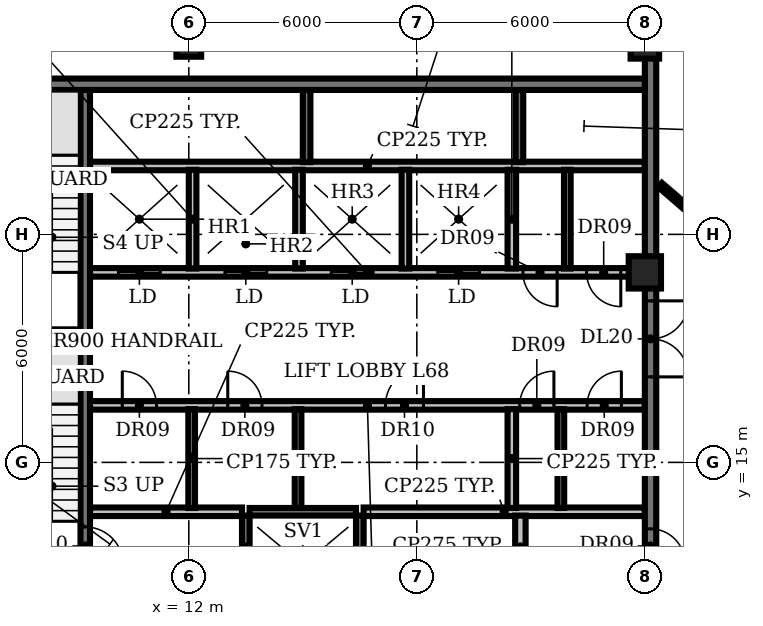
"""IFC4 building model, lengths in metres.
Left out: names, types, materials, properties, quantities, classifications, styles, units other than length and angle.
Written with IfcOpenShell. Run it as: python <this file> out.ifc"""

import sys

from ifc_helpers import new_model, si_unit, direction, frame, frame_2d, origin, origin_2d, place, context, subcontext, project, spatial, rectangle, circle, extrude, element, fill, save


model = new_model("IFC4")
c1 = context("Model", 3, precision=1e-05, world=origin(), true_north=direction((0.0, 1.0)))
c2 = subcontext(c1, "Body", "Model", "MODEL_VIEW")
j1 = project(units=[si_unit("LENGTHUNIT", "METRE"), si_unit("PLANEANGLEUNIT", "RADIAN")], contexts=[c1])
p1 = place(None, origin())
s1 = spatial("IfcSite", under=j1, at=p1, CompositionType="ELEMENT")
p2 = place(p1, origin())
s2 = spatial("IfcBuilding", under=s1, at=p2, CompositionType="ELEMENT")
p3 = place(p2, frame((0.0, 0.0, 306.2)))
s3 = spatial("IfcBuildingStorey", under=s2, at=p3, CompositionType="ELEMENT", Elevation=306.2)
p4 = place(p3, frame((12.0, 26.0, 0.0), z_axis=(0.0, 0.0, 1.0), x_axis=(1.0, 0.0, 0.0)))
e1 = element("IfcColumn", 1, at=p4, inside=s3, PredefinedType="COLUMN", context=c2, shape_type="SweptSolid", body=[
    extrude(rectangle(XDim=0.65, YDim=0.65, at=origin_2d()), origin(), (0.0, 0.0, 1.0), 3.85),
])
p5 = place(p3, frame((24.0, 20.0, 0.0), z_axis=(0.0, 0.0, 1.0), x_axis=(1.0, 0.0, 0.0)))
e2 = element("IfcColumn", 2, at=p5, inside=s3, PredefinedType="COLUMN", context=c2, shape_type="SweptSolid", body=[
    extrude(circle(Radius=0.425, at=origin_2d()), origin(), (0.0, 0.0, 1.0), 3.85),
])
p6 = place(p3, frame((24.0, 26.0, 0.0), z_axis=(0.0, 0.0, 1.0), x_axis=(1.0, 0.0, 0.0)))
e3 = element("IfcColumn", 3, at=p6, inside=s3, PredefinedType="COLUMN", context=c2, shape_type="SweptSolid", body=[
    extrude(rectangle(XDim=0.75, YDim=0.75, at=origin_2d()), origin(), (0.0, 0.0, 1.0), 3.85),
])
p7 = place(p3, frame((9.4, 13.7, 0.0), z_axis=(0.0, 0.0, 1.0), x_axis=(1.0, 0.0, 0.0)))
e4 = element("IfcWall", 4, at=p7, inside=s3, PredefinedType="PARTITIONING", context=c2, shape_type="SweptSolid", body=[
    extrude(rectangle(XDim=4.0, YDim=0.225, at=frame_2d((2.0, 0.0))), origin(), (0.0, 0.0, 1.0), 3.85),
])
p8 = place(p3, frame((13.6, 13.7, 0.0), z_axis=(0.0, 0.0, 1.0), x_axis=(1.0, 0.0, 0.0)))
e5 = element("IfcWall", 5, at=p8, inside=s3, PredefinedType="SHEAR", context=c2, shape_type="SweptSolid", body=[
    extrude(rectangle(XDim=2.8, YDim=0.2, at=frame_2d((1.4, 0.0))), origin(), (0.0, 0.0, 1.0), 3.85),
])
p9 = place(p3, frame((16.6, 13.7, 0.0), z_axis=(0.0, 0.0, 1.0), x_axis=(1.0, 0.0, 0.0)))
e6 = element("IfcWall", 6, at=p9, inside=s3, PredefinedType="PARTITIONING", context=c2, shape_type="SweptSolid", body=[
    extrude(rectangle(XDim=7.4, YDim=0.225, at=frame_2d((3.7, 0.0))), origin(), (0.0, 0.0, 1.0), 3.85),
])
p10 = place(p3, frame((9.4, 16.5, 0.0), z_axis=(0.0, 0.0, 1.0), x_axis=(1.0, 0.0, 0.0)))
e7 = element("IfcWall", 7, at=p10, inside=s3, PredefinedType="PARTITIONING", context=c2, shape_type="SweptSolid", body=[
    extrude(rectangle(XDim=14.6, YDim=0.225, at=frame_2d((7.3, 0.0))), origin(), (0.0, 0.0, 1.0), 3.85),
])
p11 = place(p10, frame((0.85, 0.0, 0.0)))
e8 = element("IfcOpeningElement", 8, at=p11, cuts=e7, PredefinedType="OPENING", context=c2, shape_type="SweptSolid", body=[
    extrude(rectangle(XDim=0.9, YDim=2.1, at=frame_2d((0.45, 1.05))), frame((0.0, 0.123, 0.0), z_axis=(0.0, -1.0, 0.0), x_axis=(1.0, 0.0, 0.0)), (0.0, 0.0, 1.0), 0.245),
])
p12 = place(p10, frame((3.625, 0.0, 0.0)))
e9 = element("IfcOpeningElement", 9, at=p12, cuts=e7, PredefinedType="OPENING", context=c2, shape_type="SweptSolid", body=[
    extrude(rectangle(XDim=0.9, YDim=2.1, at=frame_2d((0.45, 1.05))), frame((0.0, 0.123, 0.0), z_axis=(0.0, -1.0, 0.0), x_axis=(1.0, 0.0, 0.0)), (0.0, 0.0, 1.0), 0.245),
])
p13 = place(p10, frame((7.775, 0.0, 0.0)))
e10 = element("IfcOpeningElement", 10, at=p13, cuts=e7, PredefinedType="OPENING", context=c2, shape_type="SweptSolid", body=[
    extrude(rectangle(XDim=1.0, YDim=2.1, at=frame_2d((0.5, 1.05))), frame((0.0, 0.123, 0.0), z_axis=(0.0, -1.0, 0.0), x_axis=(1.0, 0.0, 0.0)), (0.0, 0.0, 1.0), 0.245),
])
p14 = place(p10, frame((11.308, 0.0, 0.0)))
e11 = element("IfcOpeningElement", 11, at=p14, cuts=e7, PredefinedType="OPENING", context=c2, shape_type="SweptSolid", body=[
    extrude(rectangle(XDim=0.9, YDim=2.1, at=frame_2d((0.45, 1.05))), frame((0.0, 0.123, 0.0), z_axis=(0.0, -1.0, 0.0), x_axis=(1.0, 0.0, 0.0)), (0.0, 0.0, 1.0), 0.245),
])
p15 = place(p10, frame((13.083, 0.0, 0.0)))
e12 = element("IfcOpeningElement", 12, at=p15, cuts=e7, PredefinedType="OPENING", context=c2, shape_type="SweptSolid", body=[
    extrude(rectangle(XDim=0.9, YDim=2.1, at=frame_2d((0.45, 1.05))), frame((0.0, 0.123, 0.0), z_axis=(0.0, -1.0, 0.0), x_axis=(1.0, 0.0, 0.0)), (0.0, 0.0, 1.0), 0.245),
])
p16 = place(p3, frame((6.0, 18.375, 0.0), z_axis=(0.0, 0.0, 1.0), x_axis=(1.0, 0.0, 0.0)))
e13 = element("IfcWall", 13, at=p16, inside=s3, PredefinedType="SHEAR", context=c2, shape_type="SweptSolid", body=[
    extrude(rectangle(XDim=3.15, YDim=0.25, at=frame_2d((1.575, 0.0))), origin(), (0.0, 0.0, 1.0), 3.85),
])
p17 = place(p3, frame((24.0, 20.0, 0.0), z_axis=(0.0, 0.0, 1.0), x_axis=(-1.0, 0.0, 0.0)))
e14 = element("IfcWall", 14, at=p17, inside=s3, PredefinedType="PARTITIONING", context=c2, shape_type="SweptSolid", body=[
    extrude(rectangle(XDim=14.6, YDim=0.225, at=frame_2d((7.3, 0.0))), origin(), (0.0, 0.0, 1.0), 3.85),
])
p18 = place(p17, frame((12.75, 0.0, 0.0)))
e15 = element("IfcOpeningElement", 15, at=p18, cuts=e14, PredefinedType="OPENING", context=c2, shape_type="SweptSolid", body=[
    extrude(rectangle(XDim=1.1, YDim=2.1, at=frame_2d((0.55, 1.05))), frame((0.0, 0.123, 0.0), z_axis=(0.0, -1.0, 0.0), x_axis=(1.0, 0.0, 0.0)), (0.0, 0.0, 1.0), 0.245),
])
p19 = place(p17, frame((9.95, 0.0, 0.0)))
e16 = element("IfcOpeningElement", 16, at=p19, cuts=e14, PredefinedType="OPENING", context=c2, shape_type="SweptSolid", body=[
    extrude(rectangle(XDim=1.1, YDim=2.1, at=frame_2d((0.55, 1.05))), frame((0.0, 0.123, 0.0), z_axis=(0.0, -1.0, 0.0), x_axis=(1.0, 0.0, 0.0)), (0.0, 0.0, 1.0), 0.245),
])
p20 = place(p17, frame((7.15, 0.0, 0.0)))
e17 = element("IfcOpeningElement", 17, at=p20, cuts=e14, PredefinedType="OPENING", context=c2, shape_type="SweptSolid", body=[
    extrude(rectangle(XDim=1.1, YDim=2.1, at=frame_2d((0.55, 1.05))), frame((0.0, 0.123, 0.0), z_axis=(0.0, -1.0, 0.0), x_axis=(1.0, 0.0, 0.0)), (0.0, 0.0, 1.0), 0.245),
])
p21 = place(p17, frame((4.35, 0.0, 0.0)))
e18 = element("IfcOpeningElement", 18, at=p21, cuts=e14, PredefinedType="OPENING", context=c2, shape_type="SweptSolid", body=[
    extrude(rectangle(XDim=1.1, YDim=2.1, at=frame_2d((0.55, 1.05))), frame((0.0, 0.123, 0.0), z_axis=(0.0, -1.0, 0.0), x_axis=(1.0, 0.0, 0.0)), (0.0, 0.0, 1.0), 0.245),
])
p22 = place(p17, frame((2.308, 0.0, 0.0)))
e19 = element("IfcOpeningElement", 19, at=p22, cuts=e14, PredefinedType="OPENING", context=c2, shape_type="SweptSolid", body=[
    extrude(rectangle(XDim=0.9, YDim=2.1, at=frame_2d((0.45, 1.05))), frame((0.0, 0.123, 0.0), z_axis=(0.0, -1.0, 0.0), x_axis=(1.0, 0.0, 0.0)), (0.0, 0.0, 1.0), 0.245),
])
p23 = place(p17, frame((0.633, 0.0, 0.0)))
e20 = element("IfcOpeningElement", 20, at=p23, cuts=e14, PredefinedType="OPENING", context=c2, shape_type="SweptSolid", body=[
    extrude(rectangle(XDim=0.9, YDim=2.1, at=frame_2d((0.45, 1.05))), frame((0.0, 0.123, 0.0), z_axis=(0.0, -1.0, 0.0), x_axis=(1.0, 0.0, 0.0)), (0.0, 0.0, 1.0), 0.245),
])
p24 = place(p3, frame((9.4, 22.8, 0.0), z_axis=(0.0, 0.0, 1.0), x_axis=(1.0, 0.0, 0.0)))
e21 = element("IfcWall", 21, at=p24, inside=s3, PredefinedType="PARTITIONING", context=c2, shape_type="SweptSolid", body=[
    extrude(rectangle(XDim=14.6, YDim=0.225, at=frame_2d((7.3, 0.0))), origin(), (0.0, 0.0, 1.0), 3.85),
])
p25 = place(p3, frame((9.275, 18.375, 0.0), z_axis=(0.0, 0.0, 1.0), x_axis=(0.0, -1.0, 0.0)))
e22 = element("IfcWall", 22, at=p25, inside=s3, PredefinedType="SHEAR", context=c2, shape_type="SweptSolid", body=[
    extrude(rectangle(XDim=6.55, YDim=0.25, at=frame_2d((3.275, 0.0))), origin(), (0.0, 0.0, 1.0), 3.85),
])
p26 = place(p25, frame((5.075, 0.0, 0.0)))
e23 = element("IfcOpeningElement", 23, at=p26, cuts=e22, PredefinedType="OPENING", context=c2, shape_type="SweptSolid", body=[
    extrude(rectangle(XDim=1.0, YDim=2.1, at=frame_2d((0.5, 1.05))), frame((0.0, 0.135, 0.0), z_axis=(0.0, -1.0, 0.0), x_axis=(1.0, 0.0, 0.0)), (0.0, 0.0, 1.0), 0.27),
])
p27 = place(p3, frame((9.275, 18.375, 0.0), z_axis=(0.0, 0.0, 1.0), x_axis=(0.0, 1.0, 0.0)))
e24 = element("IfcWall", 24, at=p27, inside=s3, PredefinedType="SHEAR", context=c2, shape_type="SweptSolid", body=[
    extrude(rectangle(XDim=6.425, YDim=0.25, at=frame_2d((3.212, 0.0))), origin(), (0.0, 0.0, 1.0), 3.85),
])
p28 = place(p3, frame((12.075, 13.8, 0.0), z_axis=(0.0, 0.0, 1.0), x_axis=(0.0, 1.0, 0.0)))
e25 = element("IfcWall", 25, at=p28, inside=s3, PredefinedType="PARTITIONING", context=c2, shape_type="SweptSolid", body=[
    extrude(rectangle(XDim=2.6, YDim=0.175, at=frame_2d((1.3, 0.0))), origin(), (0.0, 0.0, 1.0), 3.85),
])
p29 = place(p3, frame((12.1, 20.1, 0.0), z_axis=(0.0, 0.0, 1.0), x_axis=(0.0, 1.0, 0.0)))
e26 = element("IfcWall", 26, at=p29, inside=s3, PredefinedType="SOLIDWALL", context=c2, shape_type="SweptSolid", body=[
    extrude(rectangle(XDim=2.6, YDim=0.2, at=frame_2d((1.3, 0.0))), origin(), (0.0, 0.0, 1.0), 3.85),
])
p30 = place(p3, frame((13.5, 5.4, 0.0), z_axis=(0.0, 0.0, 1.0), x_axis=(0.0, 1.0, 0.0)))
e27 = element("IfcWall", 27, at=p30, inside=s3, PredefinedType="SHEAR", context=c2, shape_type="SweptSolid", body=[
    extrude(rectangle(XDim=8.2, YDim=0.2, at=frame_2d((4.1, 0.0))), origin(), (0.0, 0.0, 1.0), 3.85),
])
p31 = place(p30, frame((0.75, 0.0, 0.0)))
e28 = element("IfcOpeningElement", 28, at=p31, cuts=e27, PredefinedType="OPENING", context=c2, shape_type="SweptSolid", body=[
    extrude(rectangle(XDim=1.1, YDim=2.1, at=frame_2d((0.55, 1.05))), frame((0.0, 0.11, 0.0), z_axis=(0.0, -1.0, 0.0), x_axis=(1.0, 0.0, 0.0)), (0.0, 0.0, 1.0), 0.22),
])
p32 = place(p30, frame((3.55, 0.0, 0.0)))
e29 = element("IfcOpeningElement", 29, at=p32, cuts=e27, PredefinedType="OPENING", context=c2, shape_type="SweptSolid", body=[
    extrude(rectangle(XDim=1.1, YDim=2.1, at=frame_2d((0.55, 1.05))), frame((0.0, 0.11, 0.0), z_axis=(0.0, -1.0, 0.0), x_axis=(1.0, 0.0, 0.0)), (0.0, 0.0, 1.0), 0.22),
])
p33 = place(p30, frame((6.35, 0.0, 0.0)))
e30 = element("IfcOpeningElement", 30, at=p33, cuts=e27, PredefinedType="OPENING", context=c2, shape_type="SweptSolid", body=[
    extrude(rectangle(XDim=1.1, YDim=2.1, at=frame_2d((0.55, 1.05))), frame((0.0, 0.11, 0.0), z_axis=(0.0, -1.0, 0.0), x_axis=(1.0, 0.0, 0.0)), (0.0, 0.0, 1.0), 0.22),
])
p34 = place(p3, frame((14.875, 13.8, 0.0), z_axis=(0.0, 0.0, 1.0), x_axis=(0.0, 1.0, 0.0)))
e31 = element("IfcWall", 31, at=p34, inside=s3, PredefinedType="PARTITIONING", context=c2, shape_type="SweptSolid", body=[
    extrude(rectangle(XDim=2.6, YDim=0.175, at=frame_2d((1.3, 0.0))), origin(), (0.0, 0.0, 1.0), 3.85),
])
p35 = place(p3, frame((14.9, 20.1, 0.0), z_axis=(0.0, 0.0, 1.0), x_axis=(0.0, 1.0, 0.0)))
e32 = element("IfcWall", 32, at=p35, inside=s3, PredefinedType="SOLIDWALL", context=c2, shape_type="SweptSolid", body=[
    extrude(rectangle(XDim=2.6, YDim=0.2, at=frame_2d((1.3, 0.0))), origin(), (0.0, 0.0, 1.0), 3.85),
])
p36 = place(p3, frame((15.1, 22.9, 0.0), z_axis=(0.0, 0.0, 1.0), x_axis=(0.0, 1.0, 0.0)))
e33 = element("IfcWall", 33, at=p36, inside=s3, PredefinedType="SHEAR", context=c2, shape_type="SweptSolid", body=[
    extrude(rectangle(XDim=1.9, YDim=0.2, at=frame_2d((0.95, 0.0))), origin(), (0.0, 0.0, 1.0), 3.85),
])
p37 = place(p3, frame((16.5, 5.4, 0.0), z_axis=(0.0, 0.0, 1.0), x_axis=(0.0, 1.0, 0.0)))
e34 = element("IfcWall", 34, at=p37, inside=s3, PredefinedType="SHEAR", context=c2, shape_type="SweptSolid", body=[
    extrude(rectangle(XDim=8.2, YDim=0.2, at=frame_2d((4.1, 0.0))), origin(), (0.0, 0.0, 1.0), 3.85),
])
p38 = place(p3, frame((17.7, 20.1, 0.0), z_axis=(0.0, 0.0, 1.0), x_axis=(0.0, 1.0, 0.0)))
e35 = element("IfcWall", 35, at=p38, inside=s3, PredefinedType="SOLIDWALL", context=c2, shape_type="SweptSolid", body=[
    extrude(rectangle(XDim=2.6, YDim=0.2, at=frame_2d((1.3, 0.0))), origin(), (0.0, 0.0, 1.0), 3.85),
])
for number, where, z_axis, x_axis in (
    (36, (20.5, 13.8, 0.0), (0.0, 0.0, 1.0), (0.0, 1.0, 0.0)),
    (37, (20.5, 20.1, 0.0), (0.0, 0.0, 1.0), (0.0, 1.0, 0.0)),
):
    element("IfcWall", number, at=place(p3, frame(where, z_axis=z_axis, x_axis=x_axis)), inside=s3, PredefinedType="PARTITIONING", context=c2, shape_type="SweptSolid", body=[
        extrude(rectangle(XDim=2.6, YDim=0.225, at=frame_2d((1.3, 0.0))), origin(), (0.0, 0.0, 1.0), 3.85),
    ])
p39 = place(p3, frame((20.7, 22.9, 0.0), z_axis=(0.0, 0.0, 1.0), x_axis=(0.0, 1.0, 0.0)))
e38 = element("IfcWall", 38, at=p39, inside=s3, PredefinedType="SHEAR", context=c2, shape_type="SweptSolid", body=[
    extrude(rectangle(XDim=1.9, YDim=0.2, at=frame_2d((0.95, 0.0))), origin(), (0.0, 0.0, 1.0), 3.85),
])
p40 = place(p3, frame((20.725, 11.95, 0.0), z_axis=(0.0, 0.0, 1.0), x_axis=(0.0, 1.0, 0.0)))
e39 = element("IfcWall", 39, at=p40, inside=s3, PredefinedType="PARTITIONING", context=c2, shape_type="SweptSolid", body=[
    extrude(rectangle(XDim=1.65, YDim=0.275, at=frame_2d((0.825, 0.0))), origin(), (0.0, 0.0, 1.0), 3.85),
])
for number, where, z_axis, x_axis in (
    (40, (21.79, 13.8, 0.0), (0.0, 0.0, 1.0), (0.0, 1.0, 0.0)),
    (41, (21.96, 20.1, 0.0), (0.0, 0.0, 1.0), (0.0, 1.0, 0.0)),
):
    element("IfcWall", number, at=place(p3, frame(where, z_axis=z_axis, x_axis=x_axis)), inside=s3, PredefinedType="PARTITIONING", context=c2, shape_type="SweptSolid", body=[
        extrude(rectangle(XDim=2.6, YDim=0.175, at=frame_2d((1.3, 0.0))), origin(), (0.0, 0.0, 1.0), 3.85),
    ])
p41 = place(p3, frame((24.15, 25.655, 0.0), z_axis=(0.0, 0.0, 1.0), x_axis=(0.0, -1.0, 0.0)))
e42 = element("IfcWall", 42, at=p41, inside=s3, PredefinedType="SHEAR", context=c2, shape_type="SweptSolid", body=[
    extrude(rectangle(XDim=20.555, YDim=0.3, at=frame_2d((10.277, 0.0))), origin(), (0.0, 0.0, 1.0), 3.85),
])
p42 = place(p41, frame((18.505, 0.0, 0.0)))
e43 = element("IfcOpeningElement", 43, at=p42, cuts=e42, PredefinedType="OPENING", context=c2, shape_type="SweptSolid", body=[
    extrude(rectangle(XDim=1.5, YDim=2.1, at=frame_2d((0.75, 1.05))), frame((0.0, 0.16, 0.0), z_axis=(0.0, -1.0, 0.0), x_axis=(1.0, 0.0, 0.0)), (0.0, 0.0, 1.0), 0.32),
])
p43 = place(p41, frame((12.405, 0.0, 0.0)))
e44 = element("IfcOpeningElement", 44, at=p43, cuts=e42, PredefinedType="OPENING", context=c2, shape_type="SweptSolid", body=[
    extrude(rectangle(XDim=0.9, YDim=2.1, at=frame_2d((0.45, 1.05))), frame((0.0, 0.16, 0.0), z_axis=(0.0, -1.0, 0.0), x_axis=(1.0, 0.0, 0.0)), (0.0, 0.0, 1.0), 0.32),
])
p44 = place(p41, frame((6.405, 0.0, 0.0)))
e45 = element("IfcOpeningElement", 45, at=p44, cuts=e42, PredefinedType="OPENING", context=c2, shape_type="SweptSolid", body=[
    extrude(rectangle(XDim=2.0, YDim=2.1, at=frame_2d((1.0, 1.05))), frame((0.0, 0.16, 0.0), z_axis=(0.0, -1.0, 0.0), x_axis=(1.0, 0.0, 0.0)), (0.0, 0.0, 1.0), 0.32),
])
p45 = place(p3, frame((6.0, 24.95, 0.0), z_axis=(0.0, 0.0, 1.0), x_axis=(1.0, 0.0, 0.0)))
e46 = element("IfcWall", 46, at=p45, inside=s3, PredefinedType="SHEAR", context=c2, shape_type="SweptSolid", body=[
    extrude(rectangle(XDim=18.0, YDim=0.3, at=frame_2d((9.0, 0.0))), origin(), (0.0, 0.0, 1.0), 3.85),
])
p46 = place(p3, frame((24.4, 22.3, 0.0), z_axis=(0.0, 0.0, 1.0), x_axis=(0.756967766194, -0.653452217796, 0.0)))
e47 = element("IfcWall", 47, at=p46, inside=s3, PredefinedType="PARTITIONING", context=c2, shape_type="SweptSolid", body=[
    extrude(rectangle(XDim=1.479, YDim=0.15, at=frame_2d((0.739, 0.0))), origin(), (0.0, 0.0, 1.0), 2.9),
])
p47 = place(p11, origin())
e48 = element("IfcDoor", 48, at=p47, inside=s3, OperationType="SINGLE_SWING_LEFT", PredefinedType="DOOR", context=c2, shape_type="SweptSolid", body=[
    extrude(rectangle(XDim=0.9, YDim=2.1, at=frame_2d((0.45, 1.05))), frame((0.0, 0.025, 0.0), z_axis=(0.0, -1.0, 0.0), x_axis=(1.0, 0.0, 0.0)), (0.0, 0.0, 1.0), 0.05),
])
fill(e8, e48)
p48 = place(p12, origin())
e49 = element("IfcDoor", 49, at=p48, inside=s3, OperationType="SINGLE_SWING_LEFT", PredefinedType="DOOR", context=c2, shape_type="SweptSolid", body=[
    extrude(rectangle(XDim=0.9, YDim=2.1, at=frame_2d((0.45, 1.05))), frame((0.0, 0.025, 0.0), z_axis=(0.0, -1.0, 0.0), x_axis=(1.0, 0.0, 0.0)), (0.0, 0.0, 1.0), 0.05),
])
fill(e9, e49)
p49 = place(p13, origin())
e50 = element("IfcDoor", 50, at=p49, inside=s3, OperationType="SINGLE_SWING_RIGHT", PredefinedType="DOOR", context=c2, shape_type="SweptSolid", body=[
    extrude(rectangle(XDim=1.0, YDim=2.1, at=frame_2d((0.5, 1.05))), frame((0.0, 0.025, 0.0), z_axis=(0.0, -1.0, 0.0), x_axis=(1.0, 0.0, 0.0)), (0.0, 0.0, 1.0), 0.05),
])
fill(e10, e50)
p50 = place(p14, origin())
e51 = element("IfcDoor", 51, at=p50, inside=s3, OperationType="SINGLE_SWING_RIGHT", PredefinedType="DOOR", context=c2, shape_type="SweptSolid", body=[
    extrude(rectangle(XDim=0.9, YDim=2.1, at=frame_2d((0.45, 1.05))), frame((0.0, 0.025, 0.0), z_axis=(0.0, -1.0, 0.0), x_axis=(1.0, 0.0, 0.0)), (0.0, 0.0, 1.0), 0.05),
])
fill(e11, e51)
p51 = place(p15, origin())
e52 = element("IfcDoor", 52, at=p51, inside=s3, OperationType="SINGLE_SWING_RIGHT", PredefinedType="DOOR", context=c2, shape_type="SweptSolid", body=[
    extrude(rectangle(XDim=0.9, YDim=2.1, at=frame_2d((0.45, 1.05))), frame((0.0, 0.025, 0.0), z_axis=(0.0, -1.0, 0.0), x_axis=(1.0, 0.0, 0.0)), (0.0, 0.0, 1.0), 0.05),
])
fill(e12, e52)
p52 = place(p18, origin())
e53 = element("IfcDoor", 53, at=p52, inside=s3, OperationType="DOUBLE_DOOR_SLIDING", PredefinedType="DOOR", context=c2, shape_type="SweptSolid", body=[
    extrude(rectangle(XDim=1.1, YDim=2.1, at=frame_2d((0.55, 1.05))), frame((0.0, 0.025, 0.0), z_axis=(0.0, -1.0, 0.0), x_axis=(1.0, 0.0, 0.0)), (0.0, 0.0, 1.0), 0.05),
])
fill(e15, e53)
p53 = place(p19, origin())
e54 = element("IfcDoor", 54, at=p53, inside=s3, OperationType="DOUBLE_DOOR_SLIDING", PredefinedType="DOOR", context=c2, shape_type="SweptSolid", body=[
    extrude(rectangle(XDim=1.1, YDim=2.1, at=frame_2d((0.55, 1.05))), frame((0.0, 0.025, 0.0), z_axis=(0.0, -1.0, 0.0), x_axis=(1.0, 0.0, 0.0)), (0.0, 0.0, 1.0), 0.05),
])
fill(e16, e54)
p54 = place(p20, origin())
e55 = element("IfcDoor", 55, at=p54, inside=s3, OperationType="DOUBLE_DOOR_SLIDING", PredefinedType="DOOR", context=c2, shape_type="SweptSolid", body=[
    extrude(rectangle(XDim=1.1, YDim=2.1, at=frame_2d((0.55, 1.05))), frame((0.0, 0.025, 0.0), z_axis=(0.0, -1.0, 0.0), x_axis=(1.0, 0.0, 0.0)), (0.0, 0.0, 1.0), 0.05),
])
fill(e17, e55)
p55 = place(p21, origin())
e56 = element("IfcDoor", 56, at=p55, inside=s3, OperationType="DOUBLE_DOOR_SLIDING", PredefinedType="DOOR", context=c2, shape_type="SweptSolid", body=[
    extrude(rectangle(XDim=1.1, YDim=2.1, at=frame_2d((0.55, 1.05))), frame((0.0, 0.025, 0.0), z_axis=(0.0, -1.0, 0.0), x_axis=(1.0, 0.0, 0.0)), (0.0, 0.0, 1.0), 0.05),
])
fill(e18, e56)
p56 = place(p22, origin())
e57 = element("IfcDoor", 57, at=p56, inside=s3, OperationType="SINGLE_SWING_LEFT", PredefinedType="DOOR", context=c2, shape_type="SweptSolid", body=[
    extrude(rectangle(XDim=0.9, YDim=2.1, at=frame_2d((0.45, 1.05))), frame((0.0, 0.025, 0.0), z_axis=(0.0, -1.0, 0.0), x_axis=(1.0, 0.0, 0.0)), (0.0, 0.0, 1.0), 0.05),
])
fill(e19, e57)
p57 = place(p23, origin())
e58 = element("IfcDoor", 58, at=p57, inside=s3, OperationType="SINGLE_SWING_LEFT", PredefinedType="DOOR", context=c2, shape_type="SweptSolid", body=[
    extrude(rectangle(XDim=0.9, YDim=2.1, at=frame_2d((0.45, 1.05))), frame((0.0, 0.025, 0.0), z_axis=(0.0, -1.0, 0.0), x_axis=(1.0, 0.0, 0.0)), (0.0, 0.0, 1.0), 0.05),
])
fill(e20, e58)
p58 = place(p26, origin())
e59 = element("IfcDoor", 59, at=p58, inside=s3, OperationType="SINGLE_SWING_RIGHT", PredefinedType="DOOR", context=c2, shape_type="SweptSolid", body=[
    extrude(rectangle(XDim=1.0, YDim=2.1, at=frame_2d((0.5, 1.05))), frame((0.0, 0.025, 0.0), z_axis=(0.0, -1.0, 0.0), x_axis=(1.0, 0.0, 0.0)), (0.0, 0.0, 1.0), 0.05),
])
fill(e23, e59)
p59 = place(p33, origin())
e60 = element("IfcDoor", 60, at=p59, inside=s3, OperationType="DOUBLE_DOOR_SLIDING", PredefinedType="DOOR", context=c2, shape_type="SweptSolid", body=[
    extrude(rectangle(XDim=1.1, YDim=2.1, at=frame_2d((0.55, 1.05))), frame((0.0, 0.025, 0.0), z_axis=(0.0, -1.0, 0.0), x_axis=(1.0, 0.0, 0.0)), (0.0, 0.0, 1.0), 0.05),
])
fill(e30, e60)
p60 = place(p43, origin())
e61 = element("IfcDoor", 61, at=p60, inside=s3, OperationType="SINGLE_SWING_RIGHT", PredefinedType="DOOR", context=c2, shape_type="SweptSolid", body=[
    extrude(rectangle(XDim=0.9, YDim=2.1, at=frame_2d((0.45, 1.05))), frame((0.0, 0.025, 0.0), z_axis=(0.0, -1.0, 0.0), x_axis=(1.0, 0.0, 0.0)), (0.0, 0.0, 1.0), 0.05),
])
fill(e44, e61)
p61 = place(p44, origin())
e62 = element("IfcDoor", 62, at=p61, inside=s3, OperationType="DOUBLE_DOOR_SINGLE_SWING", PredefinedType="DOOR", context=c2, shape_type="SweptSolid", body=[
    extrude(rectangle(XDim=2.0, YDim=2.1, at=frame_2d((1.0, 1.05))), frame((0.0, 0.025, 0.0), z_axis=(0.0, -1.0, 0.0), x_axis=(1.0, 0.0, 0.0)), (0.0, 0.0, 1.0), 0.05),
])
fill(e45, e62)
save(model, sys.argv[1])
